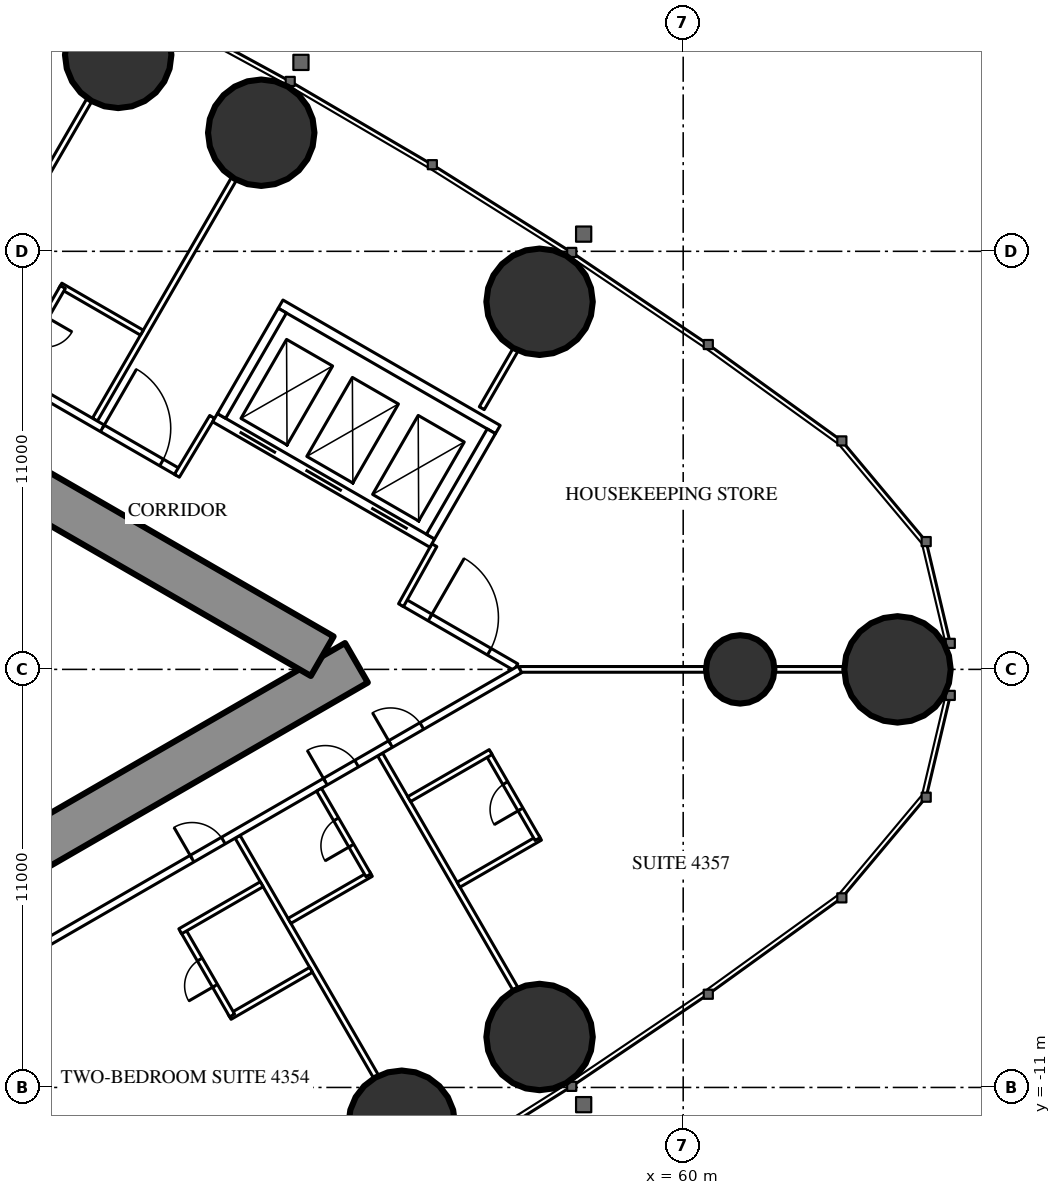
"""IFC4 building model, lengths in metres.
Left out: names, types, materials, properties, quantities, classifications, styles, units other than length and angle.
Written with IfcOpenShell. Run it as: python <this file> out.ifc"""

import sys

from ifc_helpers import new_model, si_unit, direction, frame, frame_2d, origin, origin_2d, place, context, subcontext, project, spatial, rectangle, circle, extrude, element, fill, save


model = new_model("IFC4")
c1 = context("Model", 3, precision=1e-05, world=origin(), true_north=direction((0.0, 1.0)))
c2 = subcontext(c1, "Body", "Model", "MODEL_VIEW")
j1 = project(units=[si_unit("LENGTHUNIT", "METRE"), si_unit("PLANEANGLEUNIT", "RADIAN")], contexts=[c1])
p1 = place(None, origin())
s1 = spatial("IfcSite", under=j1, at=p1, CompositionType="ELEMENT")
p2 = place(p1, origin())
s2 = spatial("IfcBuilding", under=s1, at=p2, CompositionType="ELEMENT")
p3 = place(p2, frame((0.0, 0.0, 163.3)))
s3 = spatial("IfcBuildingStorey", under=s2, at=p3, CompositionType="ELEMENT", Elevation=163.3)
for number, where, z_axis, x_axis in (
    (1, (65.64, 0.0, 0.0), (0.0, 0.0, 1.0), (1.0, 0.0, 0.0)),
    (2, (56.221, 9.672, 0.0), (0.0, 0.0, 1.0), (1.0, 0.0, 0.0)),
    (3, (48.897, 14.121, 0.0), (0.0, 0.0, 1.0), (1.0, 0.0, 0.0)),
    (4, (45.134, 16.168, 0.0), (0.0, 0.0, 1.0), (1.0, 0.0, 0.0)),
    (5, (52.594, -11.955, 0.0), (0.0, 0.0, 1.0), (1.0, 0.0, 0.0)),
    (6, (56.221, -9.672, 0.0), (0.0, 0.0, 1.0), (1.0, 0.0, 0.0)),
):
    element("IfcColumn", number, at=place(p3, frame(where, z_axis=z_axis, x_axis=x_axis)), inside=s3, PredefinedType="COLUMN", context=c2, shape_type="SweptSolid", body=[
        extrude(circle(Radius=1.4, at=origin_2d()), origin(), (0.0, 0.0, 1.0), 3.5),
    ])
p4 = place(p3, frame((61.5, 0.0, 0.0), z_axis=(0.0, 0.0, 1.0), x_axis=(1.0, 0.0, 0.0)))
e7 = element("IfcColumn", 7, at=p4, inside=s3, PredefinedType="COLUMN", context=c2, shape_type="SweptSolid", body=[
    extrude(circle(Radius=0.9, at=origin_2d()), origin(), (0.0, 0.0, 1.0), 3.5),
])
p5 = place(p3, frame((27.2, -13.8, 0.0), z_axis=(0.0, 0.0, 1.0), x_axis=(0.866027159892, 0.499996958321, 0.0)))
e8 = element("IfcWall", 8, at=p5, inside=s3, PredefinedType="SHEAR", context=c2, shape_type="SweptSolid", body=[
    extrude(rectangle(XDim=27.947, YDim=1.2, at=frame_2d((13.973, 0.0))), origin(), (0.0, 0.0, 1.0), 3.5),
])
p6 = place(p5, frame((4.6, 0.0, 0.0)))
e9 = element("IfcOpeningElement", 9, at=p6, cuts=e8, PredefinedType="OPENING", context=c2, shape_type="SweptSolid", body=[
    extrude(rectangle(XDim=1.0, YDim=2.2, at=frame_2d((0.5, 1.1))), frame((0.0, 0.61, 0.0), z_axis=(0.0, -1.0, 0.0), x_axis=(1.0, 0.0, 0.0)), (0.0, 0.0, 1.0), 1.22),
])
p7 = place(p5, frame((13.395, 0.0, 0.0)))
e10 = element("IfcOpeningElement", 10, at=p7, cuts=e8, PredefinedType="OPENING", context=c2, shape_type="SweptSolid", body=[
    extrude(rectangle(XDim=1.8, YDim=2.2, at=frame_2d((0.9, 1.1))), frame((0.0, 0.61, 0.0), z_axis=(0.0, -1.0, 0.0), x_axis=(1.0, 0.0, 0.0)), (0.0, 0.0, 1.0), 1.22),
])
p8 = place(p3, frame((27.2, 13.8, 0.0), z_axis=(0.0, 0.0, 1.0), x_axis=(0.866024515034, -0.500001539357, 0.0)))
e11 = element("IfcWall", 11, at=p8, inside=s3, PredefinedType="SHEAR", context=c2, shape_type="SweptSolid", body=[
    extrude(rectangle(XDim=26.907, YDim=1.2, at=frame_2d((13.454, 0.0))), origin(), (0.0, 0.0, 1.0), 3.5),
])
p9 = place(p8, frame((4.6, 0.0, 0.0)))
e12 = element("IfcOpeningElement", 12, at=p9, cuts=e11, PredefinedType="OPENING", context=c2, shape_type="SweptSolid", body=[
    extrude(rectangle(XDim=1.0, YDim=2.2, at=frame_2d((0.5, 1.1))), frame((0.0, 0.61, 0.0), z_axis=(0.0, -1.0, 0.0), x_axis=(1.0, 0.0, 0.0)), (0.0, 0.0, 1.0), 1.22),
])
p10 = place(p8, frame((13.395, 0.0, 0.0)))
e13 = element("IfcOpeningElement", 13, at=p10, cuts=e11, PredefinedType="OPENING", context=c2, shape_type="SweptSolid", body=[
    extrude(rectangle(XDim=1.8, YDim=2.2, at=frame_2d((0.9, 1.1))), frame((0.0, 0.61, 0.0), z_axis=(0.0, -1.0, 0.0), x_axis=(1.0, 0.0, 0.0)), (0.0, 0.0, 1.0), 1.22),
])
p11 = place(p3, frame((40.769, -8.737, 0.0), z_axis=(0.0, 0.0, 1.0), x_axis=(0.500013115284, -0.866017831539, 0.0)))
e14 = element("IfcWall", 14, at=p11, inside=s3, PredefinedType="PARTITIONING", context=c2, shape_type="SweptSolid", body=[
    extrude(rectangle(XDim=7.198, YDim=0.15, at=frame_2d((3.599, 0.0))), origin(), (0.0, 0.0, 1.0), 2.3),
])
p12 = place(p3, frame((48.275, -4.404, 0.0), z_axis=(0.0, 0.0, 1.0), x_axis=(0.500006004368, -0.866021937133, 0.0)))
e15 = element("IfcWall", 15, at=p12, inside=s3, PredefinedType="PARTITIONING", context=c2, shape_type="SweptSolid", body=[
    extrude(rectangle(XDim=7.279, YDim=0.15, at=frame_2d((3.64, 0.0))), origin(), (0.0, 0.0, 1.0), 2.3),
])
p13 = place(p3, frame((52.025, -2.238, 0.0), z_axis=(0.0, 0.0, 1.0), x_axis=(0.499983785035, -0.866034765296, 0.0)))
e16 = element("IfcWall", 16, at=p13, inside=s3, PredefinedType="PARTITIONING", context=c2, shape_type="SweptSolid", body=[
    extrude(rectangle(XDim=7.116, YDim=0.15, at=frame_2d((3.558, 0.0))), origin(), (0.0, 0.0, 1.0), 2.3),
])
p14 = place(p3, frame((40.769, 8.737, 0.0), z_axis=(0.0, 0.0, 1.0), x_axis=(0.500013115284, 0.866017831539, 0.0)))
e17 = element("IfcWall", 17, at=p14, inside=s3, PredefinedType="PARTITIONING", context=c2, shape_type="SweptSolid", body=[
    extrude(rectangle(XDim=7.198, YDim=0.15, at=frame_2d((3.599, 0.0))), origin(), (0.0, 0.0, 1.0), 2.3),
])
p15 = place(p3, frame((44.521, 6.571, 0.0), z_axis=(0.0, 0.0, 1.0), x_axis=(0.500020376429, 0.866013639128, 0.0)))
e18 = element("IfcWall", 18, at=p15, inside=s3, PredefinedType="PARTITIONING", context=c2, shape_type="SweptSolid", body=[
    extrude(rectangle(XDim=7.306, YDim=0.15, at=frame_2d((3.653, 0.0))), origin(), (0.0, 0.0, 1.0), 2.3),
])
p16 = place(p3, frame((55.702, 0.0, 0.0), z_axis=(0.0, 0.0, 1.0), x_axis=(1.0, 0.0, 0.0)))
e19 = element("IfcWall", 19, at=p16, inside=s3, PredefinedType="PARTITIONING", context=c2, shape_type="SweptSolid", body=[
    extrude(rectangle(XDim=8.518, YDim=0.15, at=frame_2d((4.259, 0.0))), origin(), (0.0, 0.0, 1.0), 2.3),
])
p17 = place(p3, frame((54.7, 6.872, 0.0), z_axis=(0.0, 0.0, 1.0), x_axis=(0.499989690894, 0.866031355668, 0.0)))
e20 = element("IfcWall", 20, at=p17, inside=s3, PredefinedType="PARTITIONING", context=c2, shape_type="SweptSolid", body=[
    extrude(rectangle(XDim=1.766, YDim=0.15, at=frame_2d((0.883, 0.0))), origin(), (0.0, 0.0, 1.0), 3.25),
])
p18 = place(p3, frame((27.959, 16.017, 0.0), z_axis=(0.0, 0.0, 1.0), x_axis=(0.866027146794, -0.499996981007, 0.0)))
e21 = element("IfcWall", 21, at=p18, inside=s3, PredefinedType="PARTITIONING", context=c2, shape_type="SweptSolid", body=[
    extrude(rectangle(XDim=21.657, YDim=0.2, at=frame_2d((10.829, 0.0))), origin(), (0.0, 0.0, 1.0), 3.25),
])
p19 = place(p18, frame((15.391, 0.0, 0.0)))
e22 = element("IfcOpeningElement", 22, at=p19, cuts=e21, PredefinedType="OPENING", context=c2, shape_type="SweptSolid", body=[
    extrude(rectangle(XDim=0.95, YDim=2.2, at=frame_2d((0.475, 1.1))), frame((0.0, 0.11, 0.0), z_axis=(0.0, -1.0, 0.0), x_axis=(1.0, 0.0, 0.0)), (0.0, 0.0, 1.0), 0.22),
])
p20 = place(p18, frame((13.409, 0.0, 0.0)))
e23 = element("IfcOpeningElement", 23, at=p20, cuts=e21, PredefinedType="OPENING", context=c2, shape_type="SweptSolid", body=[
    extrude(rectangle(XDim=0.95, YDim=2.2, at=frame_2d((0.475, 1.1))), frame((0.0, 0.11, 0.0), z_axis=(0.0, -1.0, 0.0), x_axis=(1.0, 0.0, 0.0)), (0.0, 0.0, 1.0), 0.22),
])
p21 = place(p18, frame((0.6, 0.0, 0.0)))
e24 = element("IfcOpeningElement", 24, at=p21, cuts=e21, PredefinedType="OPENING", context=c2, shape_type="SweptSolid", body=[
    extrude(rectangle(XDim=0.95, YDim=2.2, at=frame_2d((0.475, 1.1))), frame((0.0, 0.11, 0.0), z_axis=(0.0, -1.0, 0.0), x_axis=(1.0, 0.0, 0.0)), (0.0, 0.0, 1.0), 0.22),
])
p22 = place(p18, frame((19.349, 0.0, 0.0)))
e25 = element("IfcOpeningElement", 25, at=p22, cuts=e21, PredefinedType="OPENING", context=c2, shape_type="SweptSolid", body=[
    extrude(rectangle(XDim=1.8, YDim=2.2, at=frame_2d((0.9, 1.1))), frame((0.0, 0.11, 0.0), z_axis=(0.0, -1.0, 0.0), x_axis=(1.0, 0.0, 0.0)), (0.0, 0.0, 1.0), 0.22),
])
p23 = place(p3, frame((52.639, 1.769, 0.0), z_axis=(0.0, 0.0, 1.0), x_axis=(0.866027340901, -0.4999966448, 0.0)))
e26 = element("IfcWall", 26, at=p23, inside=s3, PredefinedType="PARTITIONING", context=c2, shape_type="SweptSolid", body=[
    extrude(rectangle(XDim=3.417, YDim=0.2, at=frame_2d((1.708, 0.0))), origin(), (0.0, 0.0, 1.0), 3.25),
])
p24 = place(p23, frame((0.809, 0.0, 0.0)))
e27 = element("IfcOpeningElement", 27, at=p24, cuts=e26, PredefinedType="OPENING", context=c2, shape_type="SweptSolid", body=[
    extrude(rectangle(XDim=1.8, YDim=2.2, at=frame_2d((0.9, 1.1))), frame((0.0, 0.11, 0.0), z_axis=(0.0, -1.0, 0.0), x_axis=(1.0, 0.0, 0.0)), (0.0, 0.0, 1.0), 0.22),
])
p25 = place(p3, frame((52.576, 1.689, 0.0), z_axis=(0.0, 0.0, 1.0), x_axis=(0.485424724123, 0.874278466629, 0.0)))
e28 = element("IfcWall", 28, at=p25, inside=s3, PredefinedType="PARTITIONING", context=c2, shape_type="SweptSolid", body=[
    extrude(rectangle(XDim=1.805, YDim=0.15, at=frame_2d((0.903, 0.0))), origin(), (0.0, 0.0, 1.0), 3.25),
])
p26 = place(p3, frame((47.606, 6.643, 0.0), z_axis=(0.0, 0.0, 1.0), x_axis=(-0.514237157483, -0.857648031458, 0.0)))
e29 = element("IfcWall", 29, at=p26, inside=s3, PredefinedType="PARTITIONING", context=c2, shape_type="SweptSolid", body=[
    extrude(rectangle(XDim=1.805, YDim=0.15, at=frame_2d((0.902, 0.0))), origin(), (0.0, 0.0, 1.0), 3.25),
])
p27 = place(p3, frame((40.741, -8.638, 0.0), z_axis=(0.0, 0.0, 1.0), x_axis=(0.866022967338, 0.500004220025, 0.0)))
e30 = element("IfcWall", 30, at=p27, inside=s3, PredefinedType="PARTITIONING", context=c2, shape_type="SweptSolid", body=[
    extrude(rectangle(XDim=17.276, YDim=0.2, at=frame_2d((8.638, 0.0))), origin(), (0.0, 0.0, 1.0), 3.25),
])
p28 = place(p27, frame((7.316, 0.0, 0.0)))
e31 = element("IfcOpeningElement", 31, at=p28, cuts=e30, PredefinedType="OPENING", context=c2, shape_type="SweptSolid", body=[
    extrude(rectangle(XDim=0.95, YDim=2.2, at=frame_2d((0.475, 1.1))), frame((0.0, 0.11, 0.0), z_axis=(0.0, -1.0, 0.0), x_axis=(1.0, 0.0, 0.0)), (0.0, 0.0, 1.0), 0.22),
])
p29 = place(p27, frame((11.366, 0.0, 0.0)))
e32 = element("IfcOpeningElement", 32, at=p29, cuts=e30, PredefinedType="OPENING", context=c2, shape_type="SweptSolid", body=[
    extrude(rectangle(XDim=0.95, YDim=2.2, at=frame_2d((0.475, 1.1))), frame((0.0, 0.11, 0.0), z_axis=(0.0, -1.0, 0.0), x_axis=(1.0, 0.0, 0.0)), (0.0, 0.0, 1.0), 0.22),
])
p30 = place(p27, frame((13.347, 0.0, 0.0)))
e33 = element("IfcOpeningElement", 33, at=p30, cuts=e30, PredefinedType="OPENING", context=c2, shape_type="SweptSolid", body=[
    extrude(rectangle(XDim=0.95, YDim=2.2, at=frame_2d((0.475, 1.1))), frame((0.0, 0.11, 0.0), z_axis=(0.0, -1.0, 0.0), x_axis=(1.0, 0.0, 0.0)), (0.0, 0.0, 1.0), 0.22),
])
p31 = place(p3, frame((48.066, -9.143, 0.0), z_axis=(0.0, 0.0, 1.0), x_axis=(0.866006523861, 0.500032699561, 0.0)))
e34 = element("IfcWall", 34, at=p31, inside=s3, PredefinedType="PARTITIONING", context=c2, shape_type="SweptSolid", body=[
    extrude(rectangle(XDim=2.475, YDim=0.15, at=frame_2d((1.237, 0.0))), origin(), (0.0, 0.0, 1.0), 3.25),
])
p32 = place(p3, frame((46.831, -6.854, 0.0), z_axis=(0.0, 0.0, 1.0), x_axis=(0.500006934395, -0.866021400173, 0.0)))
e35 = element("IfcWall", 35, at=p32, inside=s3, PredefinedType="PARTITIONING", context=c2, shape_type="SweptSolid", body=[
    extrude(rectangle(XDim=2.6, YDim=0.15, at=frame_2d((1.3, 0.0))), origin(), (0.0, 0.0, 1.0), 3.25),
])
p33 = place(p32, frame((0.9, 0.0, 0.0)))
e36 = element("IfcOpeningElement", 36, at=p33, cuts=e35, PredefinedType="OPENING", context=c2, shape_type="SweptSolid", body=[
    extrude(rectangle(XDim=0.8, YDim=2.2, at=frame_2d((0.4, 1.1))), frame((0.0, 0.085, 0.0), z_axis=(0.0, -1.0, 0.0), x_axis=(1.0, 0.0, 0.0)), (0.0, 0.0, 1.0), 0.17),
])
for number, where, z_axis, x_axis in (
    (37, (46.766, -6.891, 0.0), (0.0, 0.0, 1.0), (0.866, 0.5, 0.0)),
    (38, (49.64, -6.618, 0.0), (0.0, 0.0, 1.0), (0.866, 0.5, 0.0)),
):
    element("IfcWall", number, at=place(p3, frame(where, z_axis=z_axis, x_axis=x_axis)), inside=s3, PredefinedType="PARTITIONING", context=c2, shape_type="SweptSolid", body=[
        extrude(rectangle(XDim=2.475, YDim=0.15, at=frame_2d((1.237, 0.0))), origin(), (0.0, 0.0, 1.0), 3.25),
    ])
p34 = place(p3, frame((50.418, -3.166, 0.0), z_axis=(0.0, 0.0, 1.0), x_axis=(0.499936506574, -0.866062058628, 0.0)))
e39 = element("IfcWall", 39, at=p34, inside=s3, PredefinedType="PARTITIONING", context=c2, shape_type="SweptSolid", body=[
    extrude(rectangle(XDim=2.6, YDim=0.15, at=frame_2d((1.3, 0.0))), origin(), (0.0, 0.0, 1.0), 3.25),
])
p35 = place(p34, frame((0.9, 0.0, 0.0)))
e40 = element("IfcOpeningElement", 40, at=p35, cuts=e39, PredefinedType="OPENING", context=c2, shape_type="SweptSolid", body=[
    extrude(rectangle(XDim=0.8, YDim=2.2, at=frame_2d((0.4, 1.1))), frame((0.0, 0.085, 0.0), z_axis=(0.0, -1.0, 0.0), x_axis=(1.0, 0.0, 0.0)), (0.0, 0.0, 1.0), 0.17),
])
p36 = place(p3, frame((54.09, -5.665, 0.0), z_axis=(0.0, 0.0, 1.0), x_axis=(0.866006523861, 0.500032699561, 0.0)))
e41 = element("IfcWall", 41, at=p36, inside=s3, PredefinedType="PARTITIONING", context=c2, shape_type="SweptSolid", body=[
    extrude(rectangle(XDim=2.475, YDim=0.15, at=frame_2d((1.237, 0.0))), origin(), (0.0, 0.0, 1.0), 3.25),
])
p37 = place(p3, frame((54.869, -2.213, 0.0), z_axis=(0.0, 0.0, 1.0), x_axis=(0.500047596559, -0.865997922154, 0.0)))
e42 = element("IfcWall", 42, at=p37, inside=s3, PredefinedType="PARTITIONING", context=c2, shape_type="SweptSolid", body=[
    extrude(rectangle(XDim=2.6, YDim=0.15, at=frame_2d((1.3, 0.0))), origin(), (0.0, 0.0, 1.0), 3.25),
])
p38 = place(p37, frame((0.9, 0.0, 0.0)))
e43 = element("IfcOpeningElement", 43, at=p38, cuts=e42, PredefinedType="OPENING", context=c2, shape_type="SweptSolid", body=[
    extrude(rectangle(XDim=0.8, YDim=2.2, at=frame_2d((0.4, 1.1))), frame((0.0, 0.085, 0.0), z_axis=(0.0, -1.0, 0.0), x_axis=(1.0, 0.0, 0.0)), (0.0, 0.0, 1.0), 0.17),
])
p39 = place(p3, frame((52.79, -3.413, 0.0), z_axis=(0.0, 0.0, 1.0), x_axis=(0.866006523861, 0.500032699561, 0.0)))
e44 = element("IfcWall", 44, at=p39, inside=s3, PredefinedType="PARTITIONING", context=c2, shape_type="SweptSolid", body=[
    extrude(rectangle(XDim=2.475, YDim=0.15, at=frame_2d((1.237, 0.0))), origin(), (0.0, 0.0, 1.0), 3.25),
])
p40 = place(p3, frame((43.613, 10.097, 0.0), z_axis=(0.0, 0.0, 1.0), x_axis=(0.866031185235, -0.4999899861, 0.0)))
e45 = element("IfcWall", 45, at=p40, inside=s3, PredefinedType="PARTITIONING", context=c2, shape_type="SweptSolid", body=[
    extrude(rectangle(XDim=2.475, YDim=0.15, at=frame_2d((1.238, 0.0))), origin(), (0.0, 0.0, 1.0), 3.25),
])
p41 = place(p3, frame((42.378, 7.808, 0.0), z_axis=(0.0, 0.0, 1.0), x_axis=(0.500006934395, 0.866021400173, 0.0)))
e46 = element("IfcWall", 46, at=p41, inside=s3, PredefinedType="PARTITIONING", context=c2, shape_type="SweptSolid", body=[
    extrude(rectangle(XDim=2.6, YDim=0.15, at=frame_2d((1.3, 0.0))), origin(), (0.0, 0.0, 1.0), 3.25),
])
p42 = place(p41, frame((0.9, 0.0, 0.0)))
e47 = element("IfcOpeningElement", 47, at=p42, cuts=e46, PredefinedType="OPENING", context=c2, shape_type="SweptSolid", body=[
    extrude(rectangle(XDim=0.8, YDim=2.2, at=frame_2d((0.4, 1.1))), frame((0.0, 0.085, 0.0), z_axis=(0.0, -1.0, 0.0), x_axis=(1.0, 0.0, 0.0)), (0.0, 0.0, 1.0), 0.17),
])
p43 = place(p3, frame((47.681, 6.622, 0.0), z_axis=(0.0, 0.0, 1.0), x_axis=(0.86603344179, -0.499986077507, 0.0)))
e48 = element("IfcWall", 48, at=p43, inside=s3, PredefinedType="PARTITIONING", context=c2, shape_type="SweptSolid", body=[
    extrude(rectangle(XDim=6.6, YDim=0.25, at=frame_2d((3.3, 0.0))), origin(), (0.0, 0.0, 1.0), 3.25),
])
p44 = place(p43, frame((0.75, 0.0, 0.0)))
e49 = element("IfcOpeningElement", 49, at=p44, cuts=e48, PredefinedType="OPENING", context=c2, shape_type="SweptSolid", body=[
    extrude(rectangle(XDim=1.1, YDim=2.2, at=frame_2d((0.55, 1.1))), frame((0.0, 0.135, 0.0), z_axis=(0.0, -1.0, 0.0), x_axis=(1.0, 0.0, 0.0)), (0.0, 0.0, 1.0), 0.27),
])
p45 = place(p43, frame((2.75, 0.0, 0.0)))
e50 = element("IfcOpeningElement", 50, at=p45, cuts=e48, PredefinedType="OPENING", context=c2, shape_type="SweptSolid", body=[
    extrude(rectangle(XDim=1.1, YDim=2.2, at=frame_2d((0.55, 1.1))), frame((0.0, 0.135, 0.0), z_axis=(0.0, -1.0, 0.0), x_axis=(1.0, 0.0, 0.0)), (0.0, 0.0, 1.0), 0.27),
])
p46 = place(p43, frame((4.75, 0.0, 0.0)))
e51 = element("IfcOpeningElement", 51, at=p46, cuts=e48, PredefinedType="OPENING", context=c2, shape_type="SweptSolid", body=[
    extrude(rectangle(XDim=1.1, YDim=2.2, at=frame_2d((0.55, 1.1))), frame((0.0, 0.135, 0.0), z_axis=(0.0, -1.0, 0.0), x_axis=(1.0, 0.0, 0.0)), (0.0, 0.0, 1.0), 0.27),
])
p47 = place(p3, frame((49.406, 9.611, 0.0), z_axis=(0.0, 0.0, 1.0), x_axis=(0.86603344179, -0.499986077507, 0.0)))
e52 = element("IfcWall", 52, at=p47, inside=s3, PredefinedType="PARTITIONING", context=c2, shape_type="SweptSolid", body=[
    extrude(rectangle(XDim=6.6, YDim=0.25, at=frame_2d((3.3, 0.0))), origin(), (0.0, 0.0, 1.0), 3.25),
])
p48 = place(p3, frame((47.852, 6.668, 0.0), z_axis=(0.0, 0.0, 1.0), x_axis=(0.499929347863, 0.866066190972, 0.0)))
e53 = element("IfcWall", 53, at=p48, inside=s3, PredefinedType="PARTITIONING", context=c2, shape_type="SweptSolid", body=[
    extrude(rectangle(XDim=3.201, YDim=0.25, at=frame_2d((1.6, 0.0))), origin(), (0.0, 0.0, 1.0), 3.25),
])
p49 = place(p3, frame((53.352, 3.493, 0.0), z_axis=(0.0, 0.0, 1.0), x_axis=(0.499872130319, 0.866099216793, 0.0)))
e54 = element("IfcWall", 54, at=p49, inside=s3, PredefinedType="PARTITIONING", context=c2, shape_type="SweptSolid", body=[
    extrude(rectangle(XDim=3.2, YDim=0.25, at=frame_2d((1.6, 0.0))), origin(), (0.0, 0.0, 1.0), 3.25),
])
p50 = place(p33, origin())
e55 = element("IfcDoor", 55, at=p50, inside=s3, OperationType="SINGLE_SWING_RIGHT", PredefinedType="DOOR", context=c2, shape_type="SweptSolid", body=[
    extrude(rectangle(XDim=0.8, YDim=2.2, at=frame_2d((0.4, 1.1))), frame((0.0, 0.025, 0.0), z_axis=(0.0, -1.0, 0.0), x_axis=(1.0, 0.0, 0.0)), (0.0, 0.0, 1.0), 0.05),
])
fill(e36, e55)
p51 = place(p28, origin())
e56 = element("IfcDoor", 56, at=p51, inside=s3, OperationType="SINGLE_SWING_LEFT", PredefinedType="DOOR", context=c2, shape_type="SweptSolid", body=[
    extrude(rectangle(XDim=0.95, YDim=2.2, at=frame_2d((0.475, 1.1))), frame((0.0, 0.025, 0.0), z_axis=(0.0, -1.0, 0.0), x_axis=(1.0, 0.0, 0.0)), (0.0, 0.0, 1.0), 0.05),
])
fill(e31, e56)
p52 = place(p35, origin())
e57 = element("IfcDoor", 57, at=p52, inside=s3, OperationType="SINGLE_SWING_RIGHT", PredefinedType="DOOR", context=c2, shape_type="SweptSolid", body=[
    extrude(rectangle(XDim=0.8, YDim=2.2, at=frame_2d((0.4, 1.1))), frame((0.0, 0.025, 0.0), z_axis=(0.0, -1.0, 0.0), x_axis=(1.0, 0.0, 0.0)), (0.0, 0.0, 1.0), 0.05),
])
fill(e40, e57)
p53 = place(p29, origin())
e58 = element("IfcDoor", 58, at=p53, inside=s3, OperationType="SINGLE_SWING_LEFT", PredefinedType="DOOR", context=c2, shape_type="SweptSolid", body=[
    extrude(rectangle(XDim=0.95, YDim=2.2, at=frame_2d((0.475, 1.1))), frame((0.0, 0.025, 0.0), z_axis=(0.0, -1.0, 0.0), x_axis=(1.0, 0.0, 0.0)), (0.0, 0.0, 1.0), 0.05),
])
fill(e32, e58)
p54 = place(p38, origin())
e59 = element("IfcDoor", 59, at=p54, inside=s3, OperationType="SINGLE_SWING_RIGHT", PredefinedType="DOOR", context=c2, shape_type="SweptSolid", body=[
    extrude(rectangle(XDim=0.8, YDim=2.2, at=frame_2d((0.4, 1.1))), frame((0.0, 0.025, 0.0), z_axis=(0.0, -1.0, 0.0), x_axis=(1.0, 0.0, 0.0)), (0.0, 0.0, 1.0), 0.05),
])
fill(e43, e59)
p55 = place(p30, origin())
e60 = element("IfcDoor", 60, at=p55, inside=s3, OperationType="SINGLE_SWING_LEFT", PredefinedType="DOOR", context=c2, shape_type="SweptSolid", body=[
    extrude(rectangle(XDim=0.95, YDim=2.2, at=frame_2d((0.475, 1.1))), frame((0.0, 0.025, 0.0), z_axis=(0.0, -1.0, 0.0), x_axis=(1.0, 0.0, 0.0)), (0.0, 0.0, 1.0), 0.05),
])
fill(e33, e60)
p56 = place(p24, origin())
e61 = element("IfcDoor", 61, at=p56, inside=s3, OperationType="DOUBLE_DOOR_SINGLE_SWING", PredefinedType="DOOR", context=c2, shape_type="SweptSolid", body=[
    extrude(rectangle(XDim=1.8, YDim=2.2, at=frame_2d((0.9, 1.1))), frame((0.0, 0.025, 0.0), z_axis=(0.0, -1.0, 0.0), x_axis=(1.0, 0.0, 0.0)), (0.0, 0.0, 1.0), 0.05),
])
fill(e27, e61)
p57 = place(p22, origin())
e62 = element("IfcDoor", 62, at=p57, inside=s3, OperationType="DOUBLE_DOOR_SINGLE_SWING", PredefinedType="DOOR", context=c2, shape_type="SweptSolid", body=[
    extrude(rectangle(XDim=1.8, YDim=2.2, at=frame_2d((0.9, 1.1))), frame((0.0, 0.025, 0.0), z_axis=(0.0, -1.0, 0.0), x_axis=(1.0, 0.0, 0.0)), (0.0, 0.0, 1.0), 0.05),
])
fill(e25, e62)
p58 = place(p44, origin())
e63 = element("IfcDoor", 63, at=p58, inside=s3, OperationType="DOUBLE_DOOR_SLIDING", PredefinedType="USERDEFINED", context=c2, shape_type="SweptSolid", body=[
    extrude(rectangle(XDim=1.1, YDim=2.2, at=frame_2d((0.55, 1.1))), frame((0.0, 0.025, 0.0), z_axis=(0.0, -1.0, 0.0), x_axis=(1.0, 0.0, 0.0)), (0.0, 0.0, 1.0), 0.05),
])
fill(e49, e63)
p59 = place(p45, origin())
e64 = element("IfcDoor", 64, at=p59, inside=s3, OperationType="DOUBLE_DOOR_SLIDING", PredefinedType="USERDEFINED", context=c2, shape_type="SweptSolid", body=[
    extrude(rectangle(XDim=1.1, YDim=2.2, at=frame_2d((0.55, 1.1))), frame((0.0, 0.025, 0.0), z_axis=(0.0, -1.0, 0.0), x_axis=(1.0, 0.0, 0.0)), (0.0, 0.0, 1.0), 0.05),
])
fill(e50, e64)
p60 = place(p46, origin())
e65 = element("IfcDoor", 65, at=p60, inside=s3, OperationType="DOUBLE_DOOR_SLIDING", PredefinedType="USERDEFINED", context=c2, shape_type="SweptSolid", body=[
    extrude(rectangle(XDim=1.1, YDim=2.2, at=frame_2d((0.55, 1.1))), frame((0.0, 0.025, 0.0), z_axis=(0.0, -1.0, 0.0), x_axis=(1.0, 0.0, 0.0)), (0.0, 0.0, 1.0), 0.05),
])
fill(e51, e65)
save(model, sys.argv[1])
